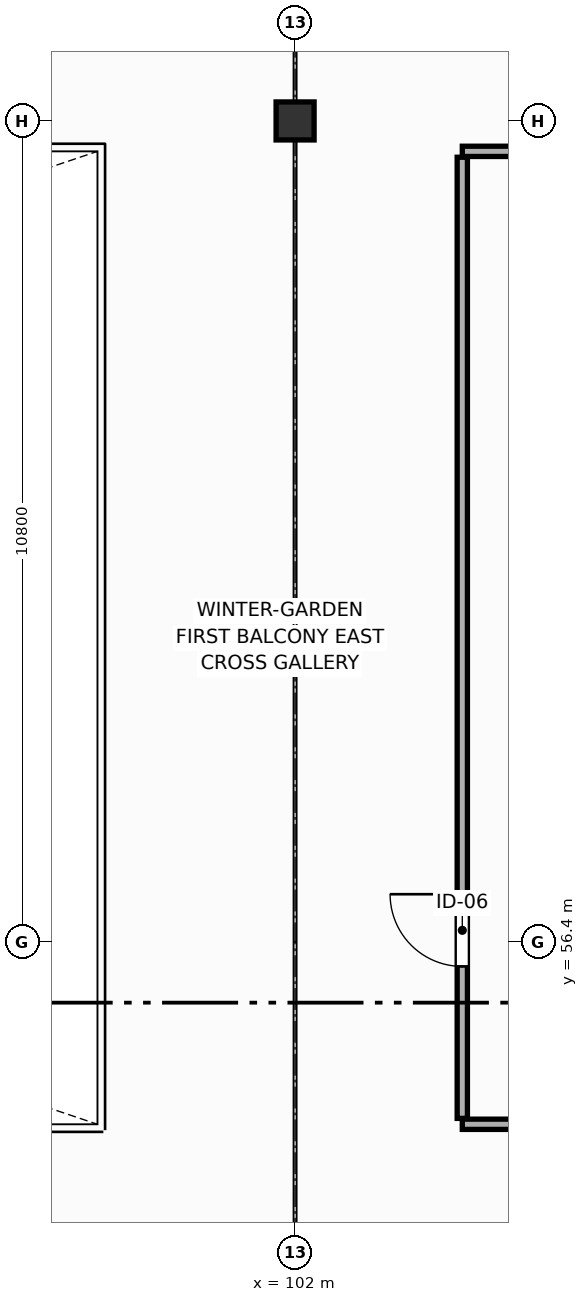
"""IFC4 building model, lengths in metres.
Left out: names, types, materials, properties, quantities, classifications, styles, units other than length and angle.
Written with IfcOpenShell. Run it as: python <this file> out.ifc"""

import sys

from ifc_helpers import new_model, si_unit, direction, frame, frame_2d, origin, origin_2d, place, context, subcontext, project, spatial, rectangle, extrude, element, fill, save


model = new_model("IFC4")
c1 = context("Model", 3, precision=1e-05, world=origin(), true_north=direction((0.0, 1.0)))
c2 = subcontext(c1, "Body", "Model", "MODEL_VIEW")
j1 = project(units=[si_unit("LENGTHUNIT", "METRE"), si_unit("PLANEANGLEUNIT", "RADIAN")], contexts=[c1])
p1 = place(None, origin())
s1 = spatial("IfcSite", under=j1, at=p1, CompositionType="ELEMENT")
p2 = place(p1, origin())
s2 = spatial("IfcBuilding", under=s1, at=p2, CompositionType="ELEMENT")
p3 = place(p2, frame((0.0, 0.0, 5.4)))
s3 = spatial("IfcBuildingStorey", under=s2, at=p3, CompositionType="ELEMENT", Elevation=5.4)
p4 = place(p3, frame((102.0, 67.2, 0.0), z_axis=(0.0, 0.0, 1.0), x_axis=(1.0, 0.0, 0.0)))
e1 = element("IfcColumn", 1, at=p4, inside=s3, PredefinedType="COLUMN", context=c2, shape_type="SweptSolid", body=[
    extrude(rectangle(XDim=0.5, YDim=0.5, at=origin_2d()), origin(), (0.0, 0.0, 1.0), 4.5),
])
for number, where, z_axis, x_axis in (
    (2, (104.2, 66.8, 0.0), (0.0, 0.0, 1.0), (1.0, 0.0, 0.0)),
    (3, (119.2, 54.0, 0.0), (0.0, 0.0, 1.0), (-1.0, 0.0, 0.0)),
):
    element("IfcWall", number, at=place(p3, frame(where, z_axis=z_axis, x_axis=x_axis)), inside=s3, PredefinedType="PARTITIONING", context=c2, shape_type="SweptSolid", body=[
        extrude(rectangle(XDim=15.0, YDim=0.135, at=frame_2d((7.5, 0.0))), origin(), (0.0, 0.0, 1.0), 3.23),
    ])
p5 = place(p3, frame((104.2, 54.077, 0.0), z_axis=(0.0, 0.0, 1.0), x_axis=(0.0, 1.0, 0.0)))
e4 = element("IfcWall", 4, at=p5, inside=s3, PredefinedType="PARTITIONING", context=c2, shape_type="SweptSolid", body=[
    extrude(rectangle(XDim=12.645, YDim=0.135, at=frame_2d((6.323, 0.0))), origin(), (0.0, 0.0, 1.0), 3.33),
])
p6 = place(p5, frame((1.999, 0.0, 0.0)))
e5 = element("IfcOpeningElement", 5, at=p6, cuts=e4, PredefinedType="OPENING", context=c2, shape_type="SweptSolid", body=[
    extrude(rectangle(XDim=0.95, YDim=2.15, at=frame_2d((0.475, 1.075))), frame((0.0, 0.077, 0.0), z_axis=(0.0, -1.0, 0.0), x_axis=(1.0, 0.0, 0.0)), (0.0, 0.0, 1.0), 0.155),
])
p7 = place(p6, origin())
e6 = element("IfcDoor", 6, at=p7, inside=s3, OperationType="SINGLE_SWING_RIGHT", PredefinedType="DOOR", context=c2, shape_type="SweptSolid", body=[
    extrude(rectangle(XDim=0.95, YDim=2.15, at=frame_2d((0.475, 1.075))), frame((0.0, 0.025, 0.0), z_axis=(0.0, -1.0, 0.0), x_axis=(1.0, 0.0, 0.0)), (0.0, 0.0, 1.0), 0.05),
])
fill(e5, e6)
save(model, sys.argv[1])
